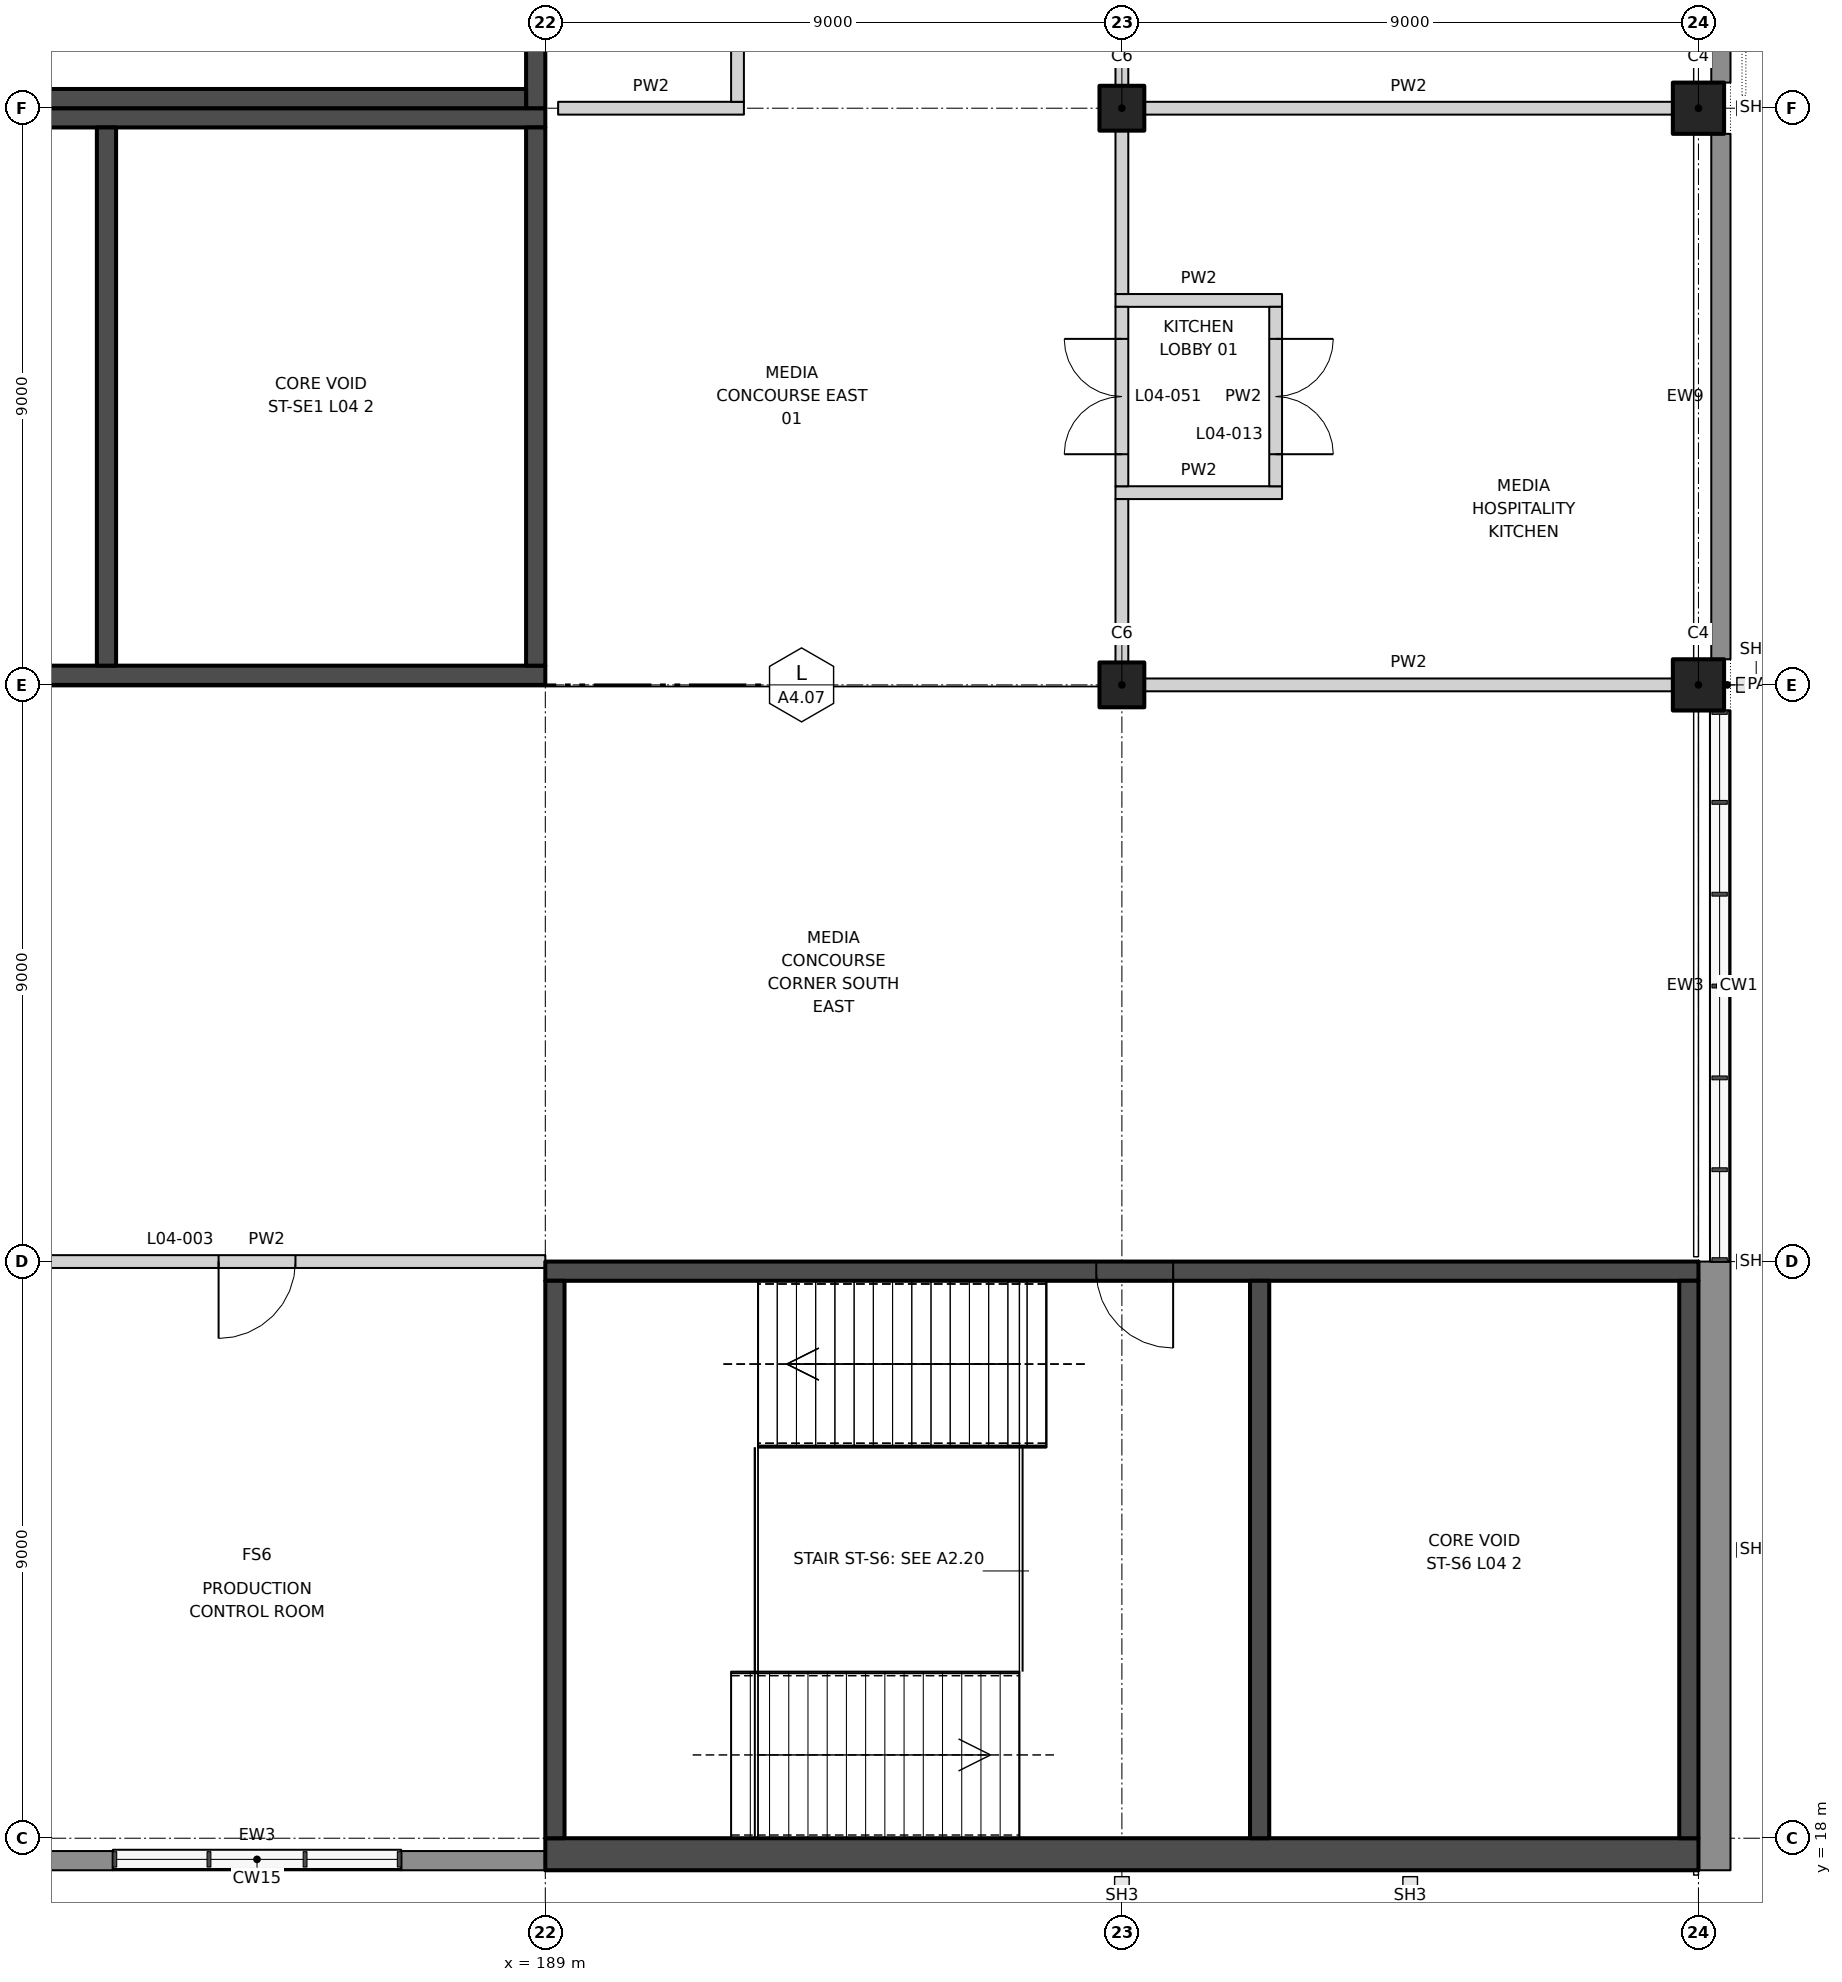
"""IFC4 building model, lengths in metres.
Left out: names, types, materials, properties, quantities, classifications, styles, units other than length and angle.
Written with IfcOpenShell. Run it as: python <this file> out.ifc"""

import sys

from ifc_helpers import new_model, si_unit, direction, frame, frame_2d, origin, origin_2d, place, context, subcontext, project, spatial, rectangle, extrude, element, fill, save


model = new_model("IFC4")
c1 = context("Model", 3, precision=1e-05, world=origin(), true_north=direction((0.0, 1.0)))
c2 = subcontext(c1, "Body", "Model", "MODEL_VIEW")
j1 = project(units=[si_unit("LENGTHUNIT", "METRE"), si_unit("PLANEANGLEUNIT", "RADIAN")], contexts=[c1])
p1 = place(None, origin())
s1 = spatial("IfcSite", under=j1, at=p1, CompositionType="ELEMENT")
p2 = place(p1, origin())
s2 = spatial("IfcBuilding", under=s1, at=p2, CompositionType="ELEMENT")
p3 = place(p2, frame((0.0, 0.0, 28.0)))
s3 = spatial("IfcBuildingStorey", under=s2, at=p3, CompositionType="ELEMENT", Elevation=28.0)
for number, where, z_axis, x_axis in (
    (1, (207.0, 36.0, 0.0), (0.0, 0.0, 1.0), (1.0, 0.0, 0.0)),
    (2, (207.0, 45.0, 0.0), (0.0, 0.0, 1.0), (1.0, 0.0, 0.0)),
):
    element("IfcColumn", number, at=place(p3, frame(where, z_axis=z_axis, x_axis=x_axis)), inside=s3, PredefinedType="COLUMN", context=c2, shape_type="SweptSolid", body=[
        extrude(rectangle(XDim=0.8, YDim=0.8, at=origin_2d()), origin(), (0.0, 0.0, 1.0), 5.5),
    ])
for number, where, z_axis, x_axis in (
    (3, (198.0, 36.0, 0.0), (0.0, 0.0, 1.0), (1.0, 0.0, 0.0)),
    (4, (198.0, 45.0, 0.0), (0.0, 0.0, 1.0), (1.0, 0.0, 0.0)),
):
    element("IfcColumn", number, at=place(p3, frame(where, z_axis=z_axis, x_axis=x_axis)), inside=s3, PredefinedType="COLUMN", context=c2, shape_type="SweptSolid", body=[
        extrude(rectangle(XDim=0.7, YDim=0.7, at=origin_2d()), origin(), (0.0, 0.0, 1.0), 5.5),
    ])
p4 = place(p3, frame((180.3, 27.0, 0.0), z_axis=(0.0, 0.0, 1.0), x_axis=(1.0, 0.0, 0.0)))
e5 = element("IfcWall", 5, at=p4, inside=s3, PredefinedType="PARTITIONING", context=c2, shape_type="SweptSolid", body=[
    extrude(rectangle(XDim=8.7, YDim=0.2, at=frame_2d((4.35, 0.0))), origin(), (0.0, 0.0, 1.0), 4.2),
])
p5 = place(p4, frame((3.6, 0.0, 0.0)))
e6 = element("IfcOpeningElement", 6, at=p5, cuts=e5, PredefinedType="OPENING", context=c2, shape_type="SweptSolid", body=[
    extrude(rectangle(XDim=1.2, YDim=2.1, at=frame_2d((0.6, 1.05))), frame((0.0, 0.11, 0.0), z_axis=(0.0, -1.0, 0.0), x_axis=(1.0, 0.0, 0.0)), (0.0, 0.0, 1.0), 0.22),
])
p6 = place(p3, frame((198.35, 36.0, 0.0), z_axis=(0.0, 0.0, 1.0), x_axis=(1.0, 0.0, 0.0)))
e7 = element("IfcWall", 7, at=p6, inside=s3, PredefinedType="PARTITIONING", context=c2, shape_type="SweptSolid", body=[
    extrude(rectangle(XDim=8.25, YDim=0.2, at=frame_2d((4.125, 0.0))), origin(), (0.0, 0.0, 1.0), 4.3),
])
for number, where, z_axis, x_axis in (
    (8, (197.9, 39.0, 0.0), (0.0, 0.0, 1.0), (1.0, 0.0, 0.0)),
    (9, (197.9, 42.0, 0.0), (0.0, 0.0, 1.0), (1.0, 0.0, 0.0)),
):
    element("IfcWall", number, at=place(p3, frame(where, z_axis=z_axis, x_axis=x_axis)), inside=s3, PredefinedType="PARTITIONING", context=c2, shape_type="SweptSolid", body=[
        extrude(rectangle(XDim=2.6, YDim=0.2, at=frame_2d((1.3, 0.0))), origin(), (0.0, 0.0, 1.0), 5.5),
    ])
p7 = place(p3, frame((189.2, 45.0, 0.0), z_axis=(0.0, 0.0, 1.0), x_axis=(1.0, 0.0, 0.0)))
e10 = element("IfcWall", 10, at=p7, inside=s3, PredefinedType="PARTITIONING", context=c2, shape_type="SweptSolid", body=[
    extrude(rectangle(XDim=2.9, YDim=0.2, at=frame_2d((1.45, 0.0))), origin(), (0.0, 0.0, 1.0), 4.2),
])
p8 = place(p3, frame((198.35, 45.0, 0.0), z_axis=(0.0, 0.0, 1.0), x_axis=(1.0, 0.0, 0.0)))
e11 = element("IfcWall", 11, at=p8, inside=s3, PredefinedType="PARTITIONING", context=c2, shape_type="SweptSolid", body=[
    extrude(rectangle(XDim=8.25, YDim=0.2, at=frame_2d((4.125, 0.0))), origin(), (0.0, 0.0, 1.0), 9.5),
])
p9 = place(p3, frame((192.0, 45.1, 0.0), z_axis=(0.0, 0.0, 1.0), x_axis=(0.0, 1.0, 0.0)))
e12 = element("IfcWall", 12, at=p9, inside=s3, PredefinedType="PARTITIONING", context=c2, shape_type="SweptSolid", body=[
    extrude(rectangle(XDim=8.825, YDim=0.2, at=frame_2d((4.413, 0.0))), origin(), (0.0, 0.0, 1.0), 5.5),
])
p10 = place(p9, frame((3.812, 0.0, 0.0)))
e13 = element("IfcOpeningElement", 13, at=p10, cuts=e12, PredefinedType="OPENING", context=c2, shape_type="SweptSolid", body=[
    extrude(rectangle(XDim=1.2, YDim=2.1, at=frame_2d((0.6, 1.05))), frame((0.0, 0.11, 0.0), z_axis=(0.0, -1.0, 0.0), x_axis=(1.0, 0.0, 0.0)), (0.0, 0.0, 1.0), 0.22),
])
p11 = place(p3, frame((198.0, 36.35, 0.0), z_axis=(0.0, 0.0, 1.0), x_axis=(0.0, 1.0, 0.0)))
e14 = element("IfcWall", 14, at=p11, inside=s3, PredefinedType="PARTITIONING", context=c2, shape_type="SweptSolid", body=[
    extrude(rectangle(XDim=2.55, YDim=0.2, at=frame_2d((1.275, 0.0))), origin(), (0.0, 0.0, 1.0), 4.2),
])
p12 = place(p3, frame((198.0, 39.1, 0.0), z_axis=(0.0, 0.0, 1.0), x_axis=(0.0, 1.0, 0.0)))
e15 = element("IfcWall", 15, at=p12, inside=s3, PredefinedType="PARTITIONING", context=c2, shape_type="SweptSolid", body=[
    extrude(rectangle(XDim=2.8, YDim=0.2, at=frame_2d((1.4, 0.0))), origin(), (0.0, 0.0, 1.0), 4.2),
])
p13 = place(p12, frame((0.5, 0.0, 0.0)))
e16 = element("IfcOpeningElement", 16, at=p13, cuts=e15, PredefinedType="OPENING", context=c2, shape_type="SweptSolid", body=[
    extrude(rectangle(XDim=1.8, YDim=2.1, at=frame_2d((0.9, 1.05))), frame((0.0, 0.11, 0.0), z_axis=(0.0, -1.0, 0.0), x_axis=(1.0, 0.0, 0.0)), (0.0, 0.0, 1.0), 0.22),
])
p14 = place(p3, frame((198.0, 42.1, 0.0), z_axis=(0.0, 0.0, 1.0), x_axis=(0.0, 1.0, 0.0)))
e17 = element("IfcWall", 17, at=p14, inside=s3, PredefinedType="PARTITIONING", context=c2, shape_type="SweptSolid", body=[
    extrude(rectangle(XDim=2.55, YDim=0.2, at=frame_2d((1.275, 0.0))), origin(), (0.0, 0.0, 1.0), 4.2),
])
p15 = place(p3, frame((198.0, 45.35, 0.0), z_axis=(0.0, 0.0, 1.0), x_axis=(0.0, 1.0, 0.0)))
e18 = element("IfcWall", 18, at=p15, inside=s3, PredefinedType="PARTITIONING", context=c2, shape_type="SweptSolid", body=[
    extrude(rectangle(XDim=8.65, YDim=0.2, at=frame_2d((4.325, 0.0))), origin(), (0.0, 0.0, 1.0), 4.2),
])
p16 = place(p15, frame((3.825, 0.0, 0.0)))
e19 = element("IfcOpeningElement", 19, at=p16, cuts=e18, PredefinedType="OPENING", context=c2, shape_type="SweptSolid", body=[
    extrude(rectangle(XDim=1.0, YDim=2.1, at=frame_2d((0.5, 1.05))), frame((0.0, 0.11, 0.0), z_axis=(0.0, -1.0, 0.0), x_axis=(1.0, 0.0, 0.0)), (0.0, 0.0, 1.0), 0.22),
])
p17 = place(p3, frame((200.4, 39.1, 0.0), z_axis=(0.0, 0.0, 1.0), x_axis=(0.0, 1.0, 0.0)))
e20 = element("IfcWall", 20, at=p17, inside=s3, PredefinedType="PARTITIONING", context=c2, shape_type="SweptSolid", body=[
    extrude(rectangle(XDim=2.8, YDim=0.2, at=frame_2d((1.4, 0.0))), origin(), (0.0, 0.0, 1.0), 5.5),
])
p18 = place(p17, frame((0.5, 0.0, 0.0)))
e21 = element("IfcOpeningElement", 21, at=p18, cuts=e20, PredefinedType="OPENING", context=c2, shape_type="SweptSolid", body=[
    extrude(rectangle(XDim=1.8, YDim=2.1, at=frame_2d((0.9, 1.05))), frame((0.0, 0.11, 0.0), z_axis=(0.0, -1.0, 0.0), x_axis=(1.0, 0.0, 0.0)), (0.0, 0.0, 1.0), 0.22),
])
for number, where, z_axis, x_axis in (
    (22, (180.0, 17.65, 0.0), (0.0, 0.0, 1.0), (1.0, 0.0, 0.0)),
    (23, (186.75, 17.65, 0.0), (0.0, 0.0, 1.0), (1.0, 0.0, 0.0)),
):
    element("IfcWall", number, at=place(p3, frame(where, z_axis=z_axis, x_axis=x_axis)), inside=s3, PredefinedType="SOLIDWALL", context=c2, shape_type="SweptSolid", body=[
        extrude(rectangle(XDim=2.25, YDim=0.3, at=frame_2d((1.125, 0.0))), origin(), (0.0, 0.0, 1.0), 4.9),
    ])
p19 = place(p3, frame((182.25, 17.65, 0.0), z_axis=(0.0, 0.0, 1.0), x_axis=(1.0, 0.0, 0.0)))
e24 = element("IfcWall", 24, at=p19, inside=s3, PredefinedType="SOLIDWALL", context=c2, shape_type="SweptSolid", body=[
    extrude(rectangle(XDim=4.5, YDim=0.3, at=frame_2d((2.25, 0.0))), origin(), (0.0, 0.0, 1.0), 1.0),
])
p20 = place(p3, frame((207.25, 17.5, 0.0), z_axis=(0.0, 0.0, 1.0), x_axis=(0.0, 1.0, 0.0)))
e25 = element("IfcWall", 25, at=p20, inside=s3, PredefinedType="SOLIDWALL", context=c2, shape_type="SweptSolid", body=[
    extrude(rectangle(XDim=9.5, YDim=0.5, at=frame_2d((4.75, 0.0))), origin(), (0.0, 0.0, 1.0), 5.5),
])
p21 = place(p3, frame((207.35, 27.0, 0.0), z_axis=(0.0, 0.0, 1.0), x_axis=(0.0, 1.0, 0.0)))
e26 = element("IfcWall", 26, at=p21, inside=s3, PredefinedType="SOLIDWALL", context=c2, shape_type="SweptSolid", body=[
    extrude(rectangle(XDim=8.6, YDim=0.3, at=frame_2d((4.3, 0.0))), origin(), (0.0, 0.0, 1.0), 1.0),
])
p22 = place(p3, frame((207.35, 36.4, 0.0), z_axis=(0.0, 0.0, 1.0), x_axis=(0.0, 1.0, 0.0)))
e27 = element("IfcWall", 27, at=p22, inside=s3, PredefinedType="SOLIDWALL", context=c2, shape_type="SweptSolid", body=[
    extrude(rectangle(XDim=8.2, YDim=0.3, at=frame_2d((4.1, 0.0))), origin(), (0.0, 0.0, 1.0), 5.5),
])
p23 = place(p3, frame((207.35, 45.4, 0.0), z_axis=(0.0, 0.0, 1.0), x_axis=(0.0, 1.0, 0.0)))
e28 = element("IfcWall", 28, at=p23, inside=s3, PredefinedType="SOLIDWALL", context=c2, shape_type="SweptSolid", body=[
    extrude(rectangle(XDim=1.85, YDim=0.3, at=frame_2d((0.925, 0.0))), origin(), (0.0, 0.0, 1.0), 4.9),
])
p24 = place(p3, frame((189.0, 26.85, 0.0), z_axis=(0.0, 0.0, 1.0), x_axis=(1.0, 0.0, 0.0)))
e29 = element("IfcWall", 29, at=p24, inside=s3, PredefinedType="SHEAR", context=c2, shape_type="SweptSolid", body=[
    extrude(rectangle(XDim=18.0, YDim=0.3, at=frame_2d((9.0, 0.0))), origin(), (0.0, 0.0, 1.0), 5.5),
])
p25 = place(p24, frame((8.6, 0.0, 0.0)))
e30 = element("IfcOpeningElement", 30, at=p25, cuts=e29, PredefinedType="OPENING", context=c2, shape_type="SweptSolid", body=[
    extrude(rectangle(XDim=1.2, YDim=2.1, at=frame_2d((0.6, 1.05))), frame((0.0, 0.16, 0.0), z_axis=(0.0, -1.0, 0.0), x_axis=(1.0, 0.0, 0.0)), (0.0, 0.0, 1.0), 0.32),
])
p26 = place(p3, frame((189.0, 17.75, 0.0), z_axis=(0.0, 0.0, 1.0), x_axis=(1.0, 0.0, 0.0)))
e31 = element("IfcWall", 31, at=p26, inside=s3, PredefinedType="SHEAR", context=c2, shape_type="SweptSolid", body=[
    extrude(rectangle(XDim=18.0, YDim=0.5, at=frame_2d((9.0, 0.0))), origin(), (0.0, 0.0, 1.0), 5.5),
])
for number, where, z_axis, x_axis in (
    (32, (189.15, 26.7, 0.0), (0.0, 0.0, 1.0), (0.0, -1.0, 0.0)),
    (33, (206.85, 26.7, 0.0), (0.0, 0.0, 1.0), (0.0, -1.0, 0.0)),
    (34, (200.15, 26.7, 0.0), (0.0, 0.0, 1.0), (0.0, -1.0, 0.0)),
):
    element("IfcWall", number, at=place(p3, frame(where, z_axis=z_axis, x_axis=x_axis)), inside=s3, PredefinedType="SHEAR", context=c2, shape_type="SweptSolid", body=[
        extrude(rectangle(XDim=8.7, YDim=0.3, at=frame_2d((4.35, 0.0))), origin(), (0.0, 0.0, 1.0), 5.5),
    ])
p27 = place(p3, frame((171.0, 44.85, 0.0), z_axis=(0.0, 0.0, 1.0), x_axis=(1.0, 0.0, 0.0)))
e35 = element("IfcWall", 35, at=p27, inside=s3, PredefinedType="SHEAR", context=c2, shape_type="SweptSolid", body=[
    extrude(rectangle(XDim=18.0, YDim=0.3, at=frame_2d((9.0, 0.0))), origin(), (0.0, 0.0, 1.0), 5.5),
])
p28 = place(p27, frame((1.5, 0.0, 0.0)))
e36 = element("IfcOpeningElement", 36, at=p28, cuts=e35, PredefinedType="OPENING", context=c2, shape_type="SweptSolid", body=[
    extrude(rectangle(XDim=1.2, YDim=2.1, at=frame_2d((0.6, 1.05))), frame((0.0, 0.16, 0.0), z_axis=(0.0, -1.0, 0.0), x_axis=(1.0, 0.0, 0.0)), (0.0, 0.0, 1.0), 0.32),
])
p29 = place(p3, frame((171.0, 36.15, 0.0), z_axis=(0.0, 0.0, 1.0), x_axis=(1.0, 0.0, 0.0)))
e37 = element("IfcWall", 37, at=p29, inside=s3, PredefinedType="SHEAR", context=c2, shape_type="SweptSolid", body=[
    extrude(rectangle(XDim=18.0, YDim=0.3, at=frame_2d((9.0, 0.0))), origin(), (0.0, 0.0, 1.0), 5.5),
])
for number, where, z_axis, x_axis in (
    (38, (188.85, 44.7, 0.0), (0.0, 0.0, 1.0), (0.0, -1.0, 0.0)),
    (39, (182.15, 44.7, 0.0), (0.0, 0.0, 1.0), (0.0, -1.0, 0.0)),
):
    element("IfcWall", number, at=place(p3, frame(where, z_axis=z_axis, x_axis=x_axis)), inside=s3, PredefinedType="SHEAR", context=c2, shape_type="SweptSolid", body=[
        extrude(rectangle(XDim=8.4, YDim=0.3, at=frame_2d((4.2, 0.0))), origin(), (0.0, 0.0, 1.0), 5.5),
    ])
p30 = place(p3, frame((188.85, 63.0, 0.0), z_axis=(0.0, 0.0, 1.0), x_axis=(0.0, -1.0, 0.0)))
e40 = element("IfcWall", 40, at=p30, inside=s3, PredefinedType="SHEAR", context=c2, shape_type="SweptSolid", body=[
    extrude(rectangle(XDim=18.0, YDim=0.3, at=frame_2d((9.0, 0.0))), origin(), (0.0, 0.0, 1.0), 5.5),
])
p31 = place(p3, frame((180.3, 45.15, 0.0), z_axis=(0.0, 0.0, 1.0), x_axis=(1.0, 0.0, 0.0)))
e41 = element("IfcWall", 41, at=p31, inside=s3, PredefinedType="SHEAR", context=c2, shape_type="SweptSolid", body=[
    extrude(rectangle(XDim=8.4, YDim=0.3, at=frame_2d((4.2, 0.0))), origin(), (0.0, 0.0, 1.0), 5.5),
])
p32 = place(p5, frame((1.2, 0.0, 0.0), z_axis=(0.0, 0.0, 1.0), x_axis=(-1.0, 0.0, 0.0)))
e42 = element("IfcDoor", 42, at=p32, inside=s3, OperationType="SINGLE_SWING_RIGHT", PredefinedType="DOOR", context=c2, shape_type="SweptSolid", body=[
    extrude(rectangle(XDim=1.2, YDim=2.1, at=frame_2d((0.6, 1.05))), frame((0.0, 0.025, 0.0), z_axis=(0.0, -1.0, 0.0), x_axis=(1.0, 0.0, 0.0)), (0.0, 0.0, 1.0), 0.05),
])
fill(e6, e42)
p33 = place(p18, frame((1.8, 0.0, 0.0), z_axis=(0.0, 0.0, 1.0), x_axis=(-1.0, 0.0, 0.0)))
e43 = element("IfcDoor", 43, at=p33, inside=s3, OperationType="DOUBLE_DOOR_DOUBLE_SWING", PredefinedType="DOOR", context=c2, shape_type="SweptSolid", body=[
    extrude(rectangle(XDim=1.8, YDim=2.1, at=frame_2d((0.9, 1.05))), frame((0.0, 0.025, 0.0), z_axis=(0.0, -1.0, 0.0), x_axis=(1.0, 0.0, 0.0)), (0.0, 0.0, 1.0), 0.05),
])
fill(e21, e43)
p34 = place(p13, origin())
e44 = element("IfcDoor", 44, at=p34, inside=s3, OperationType="DOUBLE_DOOR_DOUBLE_SWING", PredefinedType="DOOR", context=c2, shape_type="SweptSolid", body=[
    extrude(rectangle(XDim=1.8, YDim=2.1, at=frame_2d((0.9, 1.05))), frame((0.0, 0.025, 0.0), z_axis=(0.0, -1.0, 0.0), x_axis=(1.0, 0.0, 0.0)), (0.0, 0.0, 1.0), 0.05),
])
fill(e16, e44)
p35 = place(p25, frame((1.2, 0.0, 0.0), z_axis=(0.0, 0.0, 1.0), x_axis=(-1.0, 0.0, 0.0)))
e45 = element("IfcDoor", 45, at=p35, inside=s3, OperationType="SINGLE_SWING_LEFT", PredefinedType="DOOR", context=c2, shape_type="SweptSolid", body=[
    extrude(rectangle(XDim=1.2, YDim=2.1, at=frame_2d((0.6, 1.05))), frame((0.0, 0.025, 0.0), z_axis=(0.0, -1.0, 0.0), x_axis=(1.0, 0.0, 0.0)), (0.0, 0.0, 1.0), 0.05),
])
fill(e30, e45)
save(model, sys.argv[1])
